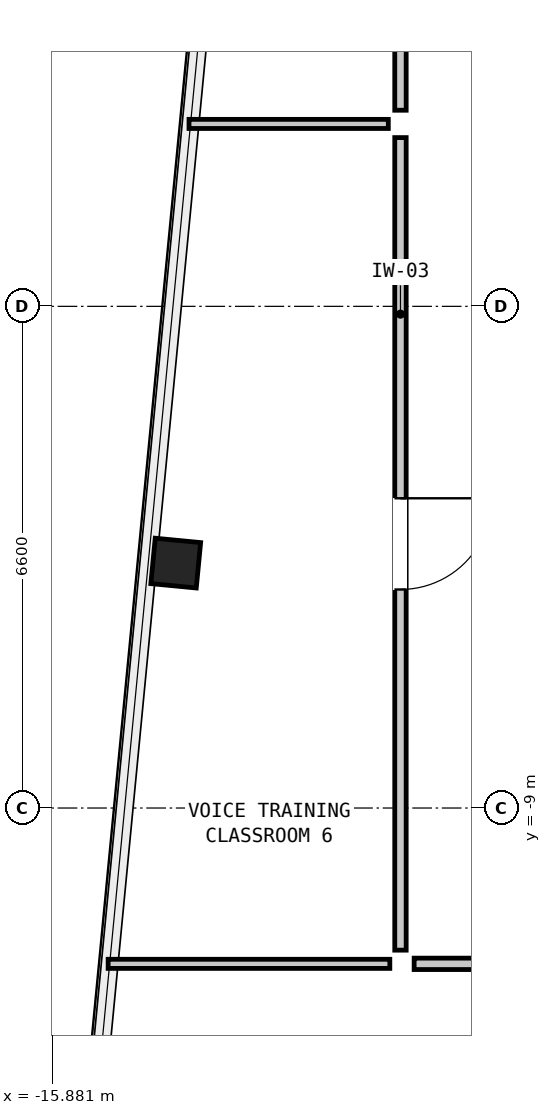
"""IFC4 building model, lengths in metres.
Left out: names, types, materials, properties, quantities, classifications, styles, units other than length and angle.
Written with IfcOpenShell. Run it as: python <this file> out.ifc"""

import sys

from ifc_helpers import new_model, si_unit, direction, frame, frame_2d, origin, origin_2d, place, context, subcontext, project, spatial, rectangle, hollow_rectangle, extrude, element, fill, save


model = new_model("IFC4")
c1 = context("Model", 3, precision=1e-05, world=origin(), true_north=direction((0.0, 1.0)))
c2 = subcontext(c1, "Body", "Model", "MODEL_VIEW")
j1 = project(units=[si_unit("LENGTHUNIT", "METRE"), si_unit("PLANEANGLEUNIT", "RADIAN")], contexts=[c1])
p1 = place(None, origin())
s1 = spatial("IfcSite", under=j1, at=p1, CompositionType="ELEMENT")
p2 = place(p1, origin())
s2 = spatial("IfcBuilding", under=s1, at=p2, CompositionType="ELEMENT")
p3 = place(p2, frame((0.0, 0.0, 270.3)))
s3 = spatial("IfcBuildingStorey", under=s2, at=p3, CompositionType="ELEMENT", Elevation=270.3)
p4 = place(p3, frame((-14.256, -5.778, 0.0), z_axis=(0.0, 0.0, 1.0), x_axis=(0.09584575252, 0.995396198367, 0.0)))
e1 = element("IfcColumn", 1, at=p4, inside=s3, PredefinedType="COLUMN", context=c2, shape_type="SweptSolid", body=[
    extrude(hollow_rectangle(XDim=0.6, YDim=0.6, WallThickness=0.04, at=origin_2d()), origin(), (0.0, 0.0, 1.0), 3.05),
])
p5 = place(p3, frame((-15.146, -11.05, 0.0), z_axis=(0.0, 0.0, 1.0), x_axis=(1.0, 0.0, 0.0)))
e2 = element("IfcWall", 2, at=p5, inside=s3, PredefinedType="PARTITIONING", context=c2, shape_type="SweptSolid", body=[
    extrude(rectangle(XDim=3.706, YDim=0.12, at=frame_2d((1.853, 0.0))), origin(), (0.0, 0.0, 1.0), 2.86),
])
p6 = place(p3, frame((-14.082, 0.0, 0.0), z_axis=(0.0, 0.0, 1.0), x_axis=(1.0, 0.0, 0.0)))
e3 = element("IfcWall", 3, at=p6, inside=s3, PredefinedType="PARTITIONING", context=c2, shape_type="SweptSolid", body=[
    extrude(rectangle(XDim=2.622, YDim=0.12, at=frame_2d((1.311, 0.0))), origin(), (0.0, 0.0, 1.0), 2.86),
])
p7 = place(p3, frame((-11.12, -11.05, 0.0), z_axis=(0.0, 0.0, 1.0), x_axis=(1.0, 0.0, 0.0)))
e4 = element("IfcWall", 4, at=p7, inside=s3, PredefinedType="PARTITIONING", context=c2, shape_type="SweptSolid", body=[
    extrude(rectangle(XDim=10.94, YDim=0.15, at=frame_2d((5.47, 0.0))), origin(), (0.0, 0.0, 1.0), 2.86),
])
p8 = place(p7, frame((4.87, 0.0, 0.0)))
e5 = element("IfcOpeningElement", 5, at=p8, cuts=e4, PredefinedType="OPENING", context=c2, shape_type="SweptSolid", body=[
    extrude(rectangle(XDim=1.2, YDim=2.1, at=frame_2d((0.6, 1.05))), frame((0.0, 0.087, 0.0), z_axis=(0.0, -1.0, 0.0), x_axis=(1.0, 0.0, 0.0)), (0.0, 0.0, 1.0), 0.174),
])
p9 = place(p3, frame((-11.3, -0.18, 0.0), z_axis=(0.0, 0.0, 1.0), x_axis=(0.0, -1.0, 0.0)))
e6 = element("IfcWall", 6, at=p9, inside=s3, PredefinedType="PARTITIONING", context=c2, shape_type="SweptSolid", body=[
    extrude(rectangle(XDim=10.69, YDim=0.15, at=frame_2d((5.345, 0.0))), origin(), (0.0, 0.0, 1.0), 2.86),
])
p10 = place(p9, frame((4.745, 0.0, 0.0)))
e7 = element("IfcOpeningElement", 7, at=p10, cuts=e6, PredefinedType="OPENING", context=c2, shape_type="SweptSolid", body=[
    extrude(rectangle(XDim=1.2, YDim=2.1, at=frame_2d((0.6, 1.05))), frame((0.0, 0.087, 0.0), z_axis=(0.0, -1.0, 0.0), x_axis=(1.0, 0.0, 0.0)), (0.0, 0.0, 1.0), 0.174),
])
p11 = place(p3, frame((-11.3, 12.07, 0.0), z_axis=(0.0, 0.0, 1.0), x_axis=(0.0, -1.0, 0.0)))
e8 = element("IfcWall", 8, at=p11, inside=s3, PredefinedType="PARTITIONING", context=c2, shape_type="SweptSolid", body=[
    extrude(rectangle(XDim=11.89, YDim=0.15, at=frame_2d((5.945, 0.0))), origin(), (0.0, 0.0, 1.0), 2.86),
])
p12 = place(p11, frame((9.625, 0.0, 0.0)))
e9 = element("IfcOpeningElement", 9, at=p12, cuts=e8, PredefinedType="OPENING", context=c2, shape_type="SweptSolid", body=[
    extrude(rectangle(XDim=1.2, YDim=2.1, at=frame_2d((0.6, 1.05))), frame((0.0, 0.087, 0.0), z_axis=(0.0, -1.0, 0.0), x_axis=(1.0, 0.0, 0.0)), (0.0, 0.0, 1.0), 0.174),
])
p13 = place(p10, origin())
e10 = element("IfcDoor", 10, at=p13, inside=s3, OperationType="SINGLE_SWING_LEFT", PredefinedType="DOOR", context=c2, shape_type="SweptSolid", body=[
    extrude(rectangle(XDim=1.2, YDim=2.1, at=frame_2d((0.6, 1.05))), frame((0.0, 0.025, 0.0), z_axis=(0.0, -1.0, 0.0), x_axis=(1.0, 0.0, 0.0)), (0.0, 0.0, 1.0), 0.05),
])
fill(e7, e10)
save(model, sys.argv[1])
